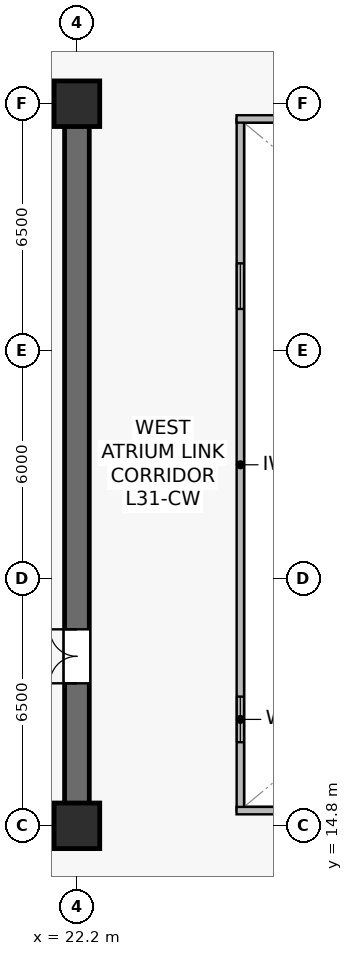
"""IFC4 building model, lengths in metres.
Left out: names, types, materials, properties, quantities, classifications, styles, units other than length and angle.
Written with IfcOpenShell. Run it as: python <this file> out.ifc"""

import sys

from ifc_helpers import new_model, si_unit, direction, frame, frame_2d, origin, origin_2d, place, context, subcontext, project, spatial, rectangle, extrude, source, transform, mapped, element, fill, save


model = new_model("IFC4")
c1 = context("Model", 3, precision=1e-05, world=origin(), true_north=direction((0.0, 1.0)))
c2 = subcontext(c1, "Body", "Model", "MODEL_VIEW")
j1 = project(units=[si_unit("LENGTHUNIT", "METRE"), si_unit("PLANEANGLEUNIT", "RADIAN")], contexts=[c1])
p1 = place(None, origin())
s1 = spatial("IfcSite", under=j1, at=p1, CompositionType="ELEMENT")
p2 = place(p1, origin())
s2 = spatial("IfcBuilding", under=s1, at=p2, CompositionType="ELEMENT")
p3 = place(p2, frame((0.0, 0.0, 129.7)))
s3 = spatial("IfcBuildingStorey", under=s2, at=p3, CompositionType="ELEMENT", Elevation=129.7)
p4 = place(p3, frame((7.075, 14.8, 0.0), z_axis=(0.0, 0.0, 1.0), x_axis=(1.0, 0.0, 0.0)))
e1 = element("IfcWall", 1, at=p4, inside=s3, PredefinedType="SHEAR", context=c2, shape_type="SweptSolid", body=[
    extrude(rectangle(XDim=15.45, YDim=0.65, at=frame_2d((7.725, 0.0))), origin(), (0.0, 0.0, 1.0), 3.79),
])
p5 = place(p3, frame((7.075, 33.8, 0.0), z_axis=(0.0, 0.0, 1.0), x_axis=(1.0, 0.0, 0.0)))
e2 = element("IfcWall", 2, at=p5, inside=s3, PredefinedType="SHEAR", context=c2, shape_type="SweptSolid", body=[
    extrude(rectangle(XDim=15.45, YDim=0.65, at=frame_2d((7.725, 0.0))), origin(), (0.0, 0.0, 1.0), 3.79),
])
p6 = place(p5, frame((6.825, 0.0, 0.0)))
e3 = element("IfcOpeningElement", 3, at=p6, cuts=e2, PredefinedType="OPENING", context=c2, shape_type="SweptSolid", body=[
    extrude(rectangle(XDim=0.95, YDim=2.15, at=frame_2d((0.475, 1.075))), frame((0.0, 0.335, 0.0), z_axis=(0.0, -1.0, 0.0), x_axis=(1.0, 0.0, 0.0)), (0.0, 0.0, 1.0), 0.67),
])
p7 = place(p5, frame((11.89, 0.0, 0.0)))
e4 = element("IfcOpeningElement", 4, at=p7, cuts=e2, PredefinedType="OPENING", context=c2, shape_type="SweptSolid", body=[
    extrude(rectangle(XDim=0.95, YDim=2.15, at=frame_2d((0.475, 1.075))), frame((0.0, 0.335, 0.0), z_axis=(0.0, -1.0, 0.0), x_axis=(1.0, 0.0, 0.0)), (0.0, 0.0, 1.0), 0.67),
])
p8 = place(p3, frame((22.2, 15.125, 0.0), z_axis=(0.0, 0.0, 1.0), x_axis=(0.0, 1.0, 0.0)))
e5 = element("IfcWall", 5, at=p8, inside=s3, PredefinedType="SHEAR", context=c2, shape_type="SweptSolid", body=[
    extrude(rectangle(XDim=18.35, YDim=0.65, at=frame_2d((9.175, 0.0))), origin(), (0.0, 0.0, 1.0), 3.79),
])
p9 = place(p8, frame((3.425, 0.0, 0.0)))
e6 = element("IfcOpeningElement", 6, at=p9, cuts=e5, PredefinedType="OPENING", context=c2, shape_type="SweptSolid", body=[
    extrude(rectangle(XDim=1.42, YDim=2.2, at=frame_2d((0.71, 1.1))), frame((0.0, 0.335, 0.0), z_axis=(0.0, -1.0, 0.0), x_axis=(1.0, 0.0, 0.0)), (0.0, 0.0, 1.0), 0.67),
])
m1 = source(origin(), c2, "Body", "SweptSolid", [
    extrude(rectangle(XDim=1.2, YDim=1.2, at=origin_2d()), origin(), (0.0, 0.0, 1.0), 4.1),
])
for number, where, z_axis, x_axis in (
    (7, (22.2, 14.8, 0.0), (0.0, 0.0, 1.0), (1.0, 0.0, 0.0)),
    (8, (22.2, 33.8, 0.0), (0.0, 0.0, 1.0), (1.0, 0.0, 0.0)),
):
    element("IfcColumn", number, at=place(p3, frame(where, z_axis=z_axis, x_axis=x_axis)), inside=s3, PredefinedType="COLUMN", context=c2, shape_type="MappedRepresentation", body=[
        mapped(m1, transform((0.0, 0.0, 0.0), scale=1.0)),
    ])
p10 = place(p3, frame((26.5, 15.2, 0.0), z_axis=(0.0, 0.0, 1.0), x_axis=(0.0, 1.0, 0.0)))
e9 = element("IfcWall", 9, at=p10, inside=s3, PredefinedType="SOLIDWALL", context=c2, shape_type="SweptSolid", body=[
    extrude(rectangle(XDim=18.2, YDim=0.195, at=frame_2d((9.1, 0.0))), origin(), (0.0, 0.0, 1.0), 3.79),
])
p11 = place(p10, frame((1.8, 0.0, 0.9)))
e10 = element("IfcOpeningElement", 10, at=p11, cuts=e9, PredefinedType="OPENING", context=c2, shape_type="SweptSolid", body=[
    extrude(rectangle(XDim=1.2, YDim=1.35, at=frame_2d((0.6, 0.675))), frame((0.0, 0.107, 0.0), z_axis=(0.0, -1.0, 0.0), x_axis=(1.0, 0.0, 0.0)), (0.0, 0.0, 1.0), 0.215),
])
p12 = place(p10, frame((13.2, 0.0, 0.9)))
e11 = element("IfcOpeningElement", 11, at=p12, cuts=e9, PredefinedType="OPENING", context=c2, shape_type="SweptSolid", body=[
    extrude(rectangle(XDim=1.2, YDim=1.35, at=frame_2d((0.6, 0.675))), frame((0.0, 0.107, 0.0), z_axis=(0.0, -1.0, 0.0), x_axis=(1.0, 0.0, 0.0)), (0.0, 0.0, 1.0), 0.215),
])
for number, where, z_axis, x_axis in (
    (12, (26.4, 15.2, 0.0), (0.0, 0.0, 1.0), (1.0, 0.0, 0.0)),
    (13, (26.4, 33.4, 0.0), (0.0, 0.0, 1.0), (1.0, 0.0, 0.0)),
):
    element("IfcWall", number, at=place(p3, frame(where, z_axis=z_axis, x_axis=x_axis)), inside=s3, PredefinedType="SOLIDWALL", context=c2, shape_type="SweptSolid", body=[
        extrude(rectangle(XDim=22.0, YDim=0.195, at=frame_2d((11.0, 0.0))), origin(), (0.0, 0.0, 1.0), 3.79),
    ])
m2 = source(origin(), c2, "Body", "SweptSolid", [
    extrude(rectangle(XDim=1.2, YDim=1.35, at=frame_2d((0.6, 0.675))), frame((0.0, 0.03, 0.0), z_axis=(0.0, -1.0, 0.0), x_axis=(1.0, 0.0, 0.0)), (0.0, 0.0, 1.0), 0.06),
])
p13 = place(p11, origin())
e14 = element("IfcWindow", 14, at=p13, inside=s3, PartitioningType="SINGLE_PANEL", PredefinedType="WINDOW", context=c2, shape_type="MappedRepresentation", body=[
    mapped(m2, transform((0.0, 0.0, 0.0), scale=1.0)),
])
fill(e10, e14)
p14 = place(p12, origin())
e15 = element("IfcWindow", 15, at=p14, inside=s3, PartitioningType="SINGLE_PANEL", PredefinedType="WINDOW", context=c2, shape_type="MappedRepresentation", body=[
    mapped(m2, transform((0.0, 0.0, 0.0), scale=1.0)),
])
fill(e11, e15)
m3 = source(origin(), c2, "Body", "SweptSolid", [
    extrude(rectangle(XDim=1.42, YDim=2.2, at=frame_2d((0.71, 1.1))), frame((0.0, 0.025, 0.0), z_axis=(0.0, -1.0, 0.0), x_axis=(1.0, 0.0, 0.0)), (0.0, 0.0, 1.0), 0.05),
])
p15 = place(p9, origin())
e16 = element("IfcDoor", 16, at=p15, inside=s3, OperationType="DOUBLE_DOOR_SINGLE_SWING", PredefinedType="DOOR", context=c2, shape_type="MappedRepresentation", body=[
    mapped(m3, transform((0.0, 0.0, 0.0), scale=1.0)),
])
fill(e6, e16)
save(model, sys.argv[1])
